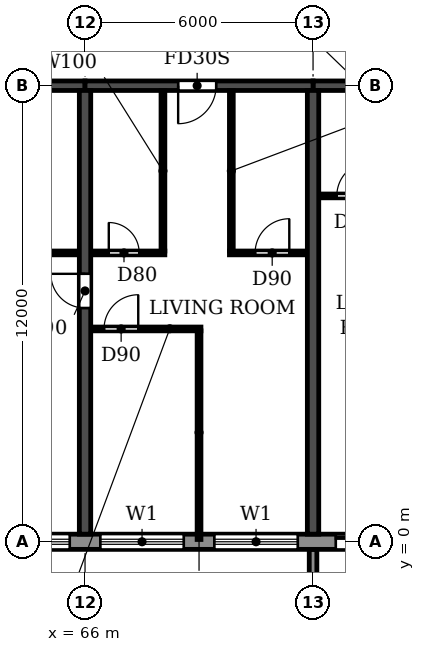
"""IFC4 building model, lengths in metres.
Left out: names, types, materials, properties, quantities, classifications, styles, units other than length and angle.
Written with IfcOpenShell. Run it as: python <this file> out.ifc"""

import sys

from ifc_helpers import new_model, si_unit, direction, frame, frame_2d, origin, place, context, subcontext, project, spatial, polyline, rectangle, outline, extrude, source, transform, mapped, element, fill, save


model = new_model("IFC4")
c1 = context("Model", 3, precision=1e-05, world=origin(), true_north=direction((0.0, 1.0)))
c2 = subcontext(c1, "Body", "Model", "MODEL_VIEW")
j1 = project(units=[si_unit("LENGTHUNIT", "METRE"), si_unit("PLANEANGLEUNIT", "RADIAN")], contexts=[c1])
p1 = place(None, origin())
s1 = spatial("IfcSite", under=j1, at=p1, CompositionType="ELEMENT")
p2 = place(p1, origin())
s2 = spatial("IfcBuilding", under=s1, at=p2, CompositionType="ELEMENT")
p3 = place(p2, frame((0.0, 0.0, 162.0)))
s3 = spatial("IfcBuildingStorey", under=s2, at=p3, CompositionType="ELEMENT", Elevation=162.0)
p4 = place(p3, frame((66.0, 0.2, 0.0), z_axis=(0.0, 0.0, 1.0), x_axis=(0.0, 1.0, 0.0)))
e1 = element("IfcWall", 1, at=p4, inside=s3, PredefinedType="SHEAR", context=c2, shape_type="SweptSolid", body=[
    extrude(rectangle(XDim=11.675, YDim=0.3, at=frame_2d((5.837, 0.0))), origin(), (0.0, 0.0, 1.0), 2.95),
])
p5 = place(p4, frame((5.95, 0.0, 0.0)))
e2 = element("IfcOpeningElement", 2, at=p5, cuts=e1, PredefinedType="OPENING", context=c2, shape_type="SweptSolid", body=[
    extrude(rectangle(XDim=0.9, YDim=2.1, at=frame_2d((0.45, 1.05))), frame((0.0, 0.16, 0.0), z_axis=(0.0, -1.0, 0.0), x_axis=(1.0, 0.0, 0.0)), (0.0, 0.0, 1.0), 0.32),
])
p6 = place(p3, frame((72.0, 0.2, 0.0), z_axis=(0.0, 0.0, 1.0), x_axis=(0.0, 1.0, 0.0)))
e3 = element("IfcWall", 3, at=p6, inside=s3, PredefinedType="SHEAR", context=c2, shape_type="SweptSolid", body=[
    extrude(rectangle(XDim=11.675, YDim=0.3, at=frame_2d((5.837, 0.0))), origin(), (0.0, 0.0, 1.0), 2.95),
])
p7 = place(p3, frame((60.0, 12.0, 0.0), z_axis=(0.0, 0.0, 1.0), x_axis=(1.0, 0.0, 0.0)))
e4 = element("IfcWall", 4, at=p7, inside=s3, PredefinedType="SHEAR", context=c2, shape_type="SweptSolid", body=[
    extrude(rectangle(XDim=6.0, YDim=0.25, at=frame_2d((3.0, 0.0))), origin(), (0.0, 0.0, 1.0), 2.35),
])
p8 = place(p3, frame((66.0, 12.0, 0.0), z_axis=(0.0, 0.0, 1.0), x_axis=(1.0, 0.0, 0.0)))
e5 = element("IfcWall", 5, at=p8, inside=s3, PredefinedType="SHEAR", context=c2, shape_type="SweptSolid", body=[
    extrude(rectangle(XDim=6.0, YDim=0.25, at=frame_2d((3.0, 0.0))), origin(), (0.0, 0.0, 1.0), 2.35),
])
p9 = place(p8, frame((2.45, 0.0, 0.0)))
e6 = element("IfcOpeningElement", 6, at=p9, cuts=e5, PredefinedType="OPENING", context=c2, shape_type="SweptSolid", body=[
    extrude(rectangle(XDim=1.0, YDim=2.1, at=frame_2d((0.5, 1.05))), frame((0.0, 0.135, 0.0), z_axis=(0.0, -1.0, 0.0), x_axis=(1.0, 0.0, 0.0)), (0.0, 0.0, 1.0), 0.27),
])
p10 = place(p3, frame((72.0, 12.0, 0.0), z_axis=(0.0, 0.0, 1.0), x_axis=(1.0, 0.0, 0.0)))
e7 = element("IfcWall", 7, at=p10, inside=s3, PredefinedType="SHEAR", context=c2, shape_type="SweptSolid", body=[
    extrude(rectangle(XDim=6.0, YDim=0.25, at=frame_2d((3.0, 0.0))), origin(), (0.0, 0.0, 1.0), 2.35),
])
p11 = place(p10, frame((2.55, 0.0, 0.0)))
e8 = element("IfcOpeningElement", 8, at=p11, cuts=e7, PredefinedType="OPENING", context=c2, shape_type="SweptSolid", body=[
    extrude(rectangle(XDim=1.0, YDim=2.1, at=frame_2d((0.5, 1.05))), frame((0.0, 0.135, 0.0), z_axis=(0.0, -1.0, 0.0), x_axis=(1.0, 0.0, 0.0)), (0.0, 0.0, 1.0), 0.27),
])
p12 = place(p3, frame((22.683, 0.0, 0.0), z_axis=(0.0, 0.0, 1.0), x_axis=(1.0, 0.0, 0.0)))
e9 = element("IfcWall", 9, at=p12, inside=s3, PredefinedType="STANDARD", context=c2, shape_type="SweptSolid", body=[
    extrude(rectangle(XDim=56.634, YDim=0.4, at=frame_2d((28.317, 0.0))), origin(), (0.0, 0.0, 1.0), 2.95),
])
p13 = place(p12, frame((1.717, 0.0, 0.9)))
e10 = element("IfcOpeningElement", 10, at=p13, cuts=e9, PredefinedType="OPENING", context=c2, shape_type="SweptSolid", body=[
    extrude(rectangle(XDim=2.2, YDim=1.5, at=frame_2d((1.1, 0.75))), frame((0.0, 0.21, 0.0), z_axis=(0.0, -1.0, 0.0), x_axis=(1.0, 0.0, 0.0)), (0.0, 0.0, 1.0), 0.42),
])
p14 = place(p12, frame((4.917, 0.0, 0.0)))
e11 = element("IfcOpeningElement", 11, at=p14, cuts=e9, PredefinedType="OPENING", context=c2, shape_type="SweptSolid", body=[
    extrude(rectangle(XDim=1.8, YDim=2.4, at=frame_2d((0.9, 1.2))), frame((0.0, 0.21, 0.0), z_axis=(0.0, -1.0, 0.0), x_axis=(1.0, 0.0, 0.0)), (0.0, 0.0, 1.0), 0.42),
])
p15 = place(p12, frame((7.717, 0.0, 0.9)))
e12 = element("IfcOpeningElement", 12, at=p15, cuts=e9, PredefinedType="OPENING", context=c2, shape_type="SweptSolid", body=[
    extrude(rectangle(XDim=2.2, YDim=1.5, at=frame_2d((1.1, 0.75))), frame((0.0, 0.21, 0.0), z_axis=(0.0, -1.0, 0.0), x_axis=(1.0, 0.0, 0.0)), (0.0, 0.0, 1.0), 0.42),
])
p16 = place(p12, frame((10.717, 0.0, 0.9)))
e13 = element("IfcOpeningElement", 13, at=p16, cuts=e9, PredefinedType="OPENING", context=c2, shape_type="SweptSolid", body=[
    extrude(rectangle(XDim=2.2, YDim=1.5, at=frame_2d((1.1, 0.75))), frame((0.0, 0.21, 0.0), z_axis=(0.0, -1.0, 0.0), x_axis=(1.0, 0.0, 0.0)), (0.0, 0.0, 1.0), 0.42),
])
p17 = place(p12, frame((13.717, 0.0, 0.9)))
e14 = element("IfcOpeningElement", 14, at=p17, cuts=e9, PredefinedType="OPENING", context=c2, shape_type="SweptSolid", body=[
    extrude(rectangle(XDim=2.2, YDim=1.5, at=frame_2d((1.1, 0.75))), frame((0.0, 0.21, 0.0), z_axis=(0.0, -1.0, 0.0), x_axis=(1.0, 0.0, 0.0)), (0.0, 0.0, 1.0), 0.42),
])
p18 = place(p12, frame((16.917, 0.0, 0.0)))
e15 = element("IfcOpeningElement", 15, at=p18, cuts=e9, PredefinedType="OPENING", context=c2, shape_type="SweptSolid", body=[
    extrude(rectangle(XDim=1.8, YDim=2.4, at=frame_2d((0.9, 1.2))), frame((0.0, 0.21, 0.0), z_axis=(0.0, -1.0, 0.0), x_axis=(1.0, 0.0, 0.0)), (0.0, 0.0, 1.0), 0.42),
])
p19 = place(p12, frame((19.717, 0.0, 0.9)))
e16 = element("IfcOpeningElement", 16, at=p19, cuts=e9, PredefinedType="OPENING", context=c2, shape_type="SweptSolid", body=[
    extrude(rectangle(XDim=2.2, YDim=1.5, at=frame_2d((1.1, 0.75))), frame((0.0, 0.21, 0.0), z_axis=(0.0, -1.0, 0.0), x_axis=(1.0, 0.0, 0.0)), (0.0, 0.0, 1.0), 0.42),
])
p20 = place(p12, frame((22.717, 0.0, 0.9)))
e17 = element("IfcOpeningElement", 17, at=p20, cuts=e9, PredefinedType="OPENING", context=c2, shape_type="SweptSolid", body=[
    extrude(rectangle(XDim=2.2, YDim=1.5, at=frame_2d((1.1, 0.75))), frame((0.0, 0.21, 0.0), z_axis=(0.0, -1.0, 0.0), x_axis=(1.0, 0.0, 0.0)), (0.0, 0.0, 1.0), 0.42),
])
p21 = place(p12, frame((25.717, 0.0, 0.9)))
e18 = element("IfcOpeningElement", 18, at=p21, cuts=e9, PredefinedType="OPENING", context=c2, shape_type="SweptSolid", body=[
    extrude(rectangle(XDim=2.2, YDim=1.5, at=frame_2d((1.1, 0.75))), frame((0.0, 0.21, 0.0), z_axis=(0.0, -1.0, 0.0), x_axis=(1.0, 0.0, 0.0)), (0.0, 0.0, 1.0), 0.42),
])
p22 = place(p12, frame((28.717, 0.0, 0.9)))
e19 = element("IfcOpeningElement", 19, at=p22, cuts=e9, PredefinedType="OPENING", context=c2, shape_type="SweptSolid", body=[
    extrude(rectangle(XDim=2.2, YDim=1.5, at=frame_2d((1.1, 0.75))), frame((0.0, 0.21, 0.0), z_axis=(0.0, -1.0, 0.0), x_axis=(1.0, 0.0, 0.0)), (0.0, 0.0, 1.0), 0.42),
])
p23 = place(p12, frame((31.717, 0.0, 0.9)))
e20 = element("IfcOpeningElement", 20, at=p23, cuts=e9, PredefinedType="OPENING", context=c2, shape_type="SweptSolid", body=[
    extrude(rectangle(XDim=2.2, YDim=1.5, at=frame_2d((1.1, 0.75))), frame((0.0, 0.21, 0.0), z_axis=(0.0, -1.0, 0.0), x_axis=(1.0, 0.0, 0.0)), (0.0, 0.0, 1.0), 0.42),
])
p24 = place(p12, frame((34.717, 0.0, 0.9)))
e21 = element("IfcOpeningElement", 21, at=p24, cuts=e9, PredefinedType="OPENING", context=c2, shape_type="SweptSolid", body=[
    extrude(rectangle(XDim=2.2, YDim=1.5, at=frame_2d((1.1, 0.75))), frame((0.0, 0.21, 0.0), z_axis=(0.0, -1.0, 0.0), x_axis=(1.0, 0.0, 0.0)), (0.0, 0.0, 1.0), 0.42),
])
p25 = place(p12, frame((37.717, 0.0, 0.9)))
e22 = element("IfcOpeningElement", 22, at=p25, cuts=e9, PredefinedType="OPENING", context=c2, shape_type="SweptSolid", body=[
    extrude(rectangle(XDim=2.2, YDim=1.5, at=frame_2d((1.1, 0.75))), frame((0.0, 0.21, 0.0), z_axis=(0.0, -1.0, 0.0), x_axis=(1.0, 0.0, 0.0)), (0.0, 0.0, 1.0), 0.42),
])
p26 = place(p12, frame((40.717, 0.0, 0.9)))
e23 = element("IfcOpeningElement", 23, at=p26, cuts=e9, PredefinedType="OPENING", context=c2, shape_type="SweptSolid", body=[
    extrude(rectangle(XDim=2.2, YDim=1.5, at=frame_2d((1.1, 0.75))), frame((0.0, 0.21, 0.0), z_axis=(0.0, -1.0, 0.0), x_axis=(1.0, 0.0, 0.0)), (0.0, 0.0, 1.0), 0.42),
])
p27 = place(p12, frame((43.717, 0.0, 0.9)))
e24 = element("IfcOpeningElement", 24, at=p27, cuts=e9, PredefinedType="OPENING", context=c2, shape_type="SweptSolid", body=[
    extrude(rectangle(XDim=2.2, YDim=1.5, at=frame_2d((1.1, 0.75))), frame((0.0, 0.21, 0.0), z_axis=(0.0, -1.0, 0.0), x_axis=(1.0, 0.0, 0.0)), (0.0, 0.0, 1.0), 0.42),
])
p28 = place(p12, frame((46.717, 0.0, 0.9)))
e25 = element("IfcOpeningElement", 25, at=p28, cuts=e9, PredefinedType="OPENING", context=c2, shape_type="SweptSolid", body=[
    extrude(rectangle(XDim=2.2, YDim=1.5, at=frame_2d((1.1, 0.75))), frame((0.0, 0.21, 0.0), z_axis=(0.0, -1.0, 0.0), x_axis=(1.0, 0.0, 0.0)), (0.0, 0.0, 1.0), 0.42),
])
p29 = place(p12, frame((49.917, 0.0, 0.0)))
e26 = element("IfcOpeningElement", 26, at=p29, cuts=e9, PredefinedType="OPENING", context=c2, shape_type="SweptSolid", body=[
    extrude(rectangle(XDim=1.8, YDim=2.4, at=frame_2d((0.9, 1.2))), frame((0.0, 0.21, 0.0), z_axis=(0.0, -1.0, 0.0), x_axis=(1.0, 0.0, 0.0)), (0.0, 0.0, 1.0), 0.42),
])
p30 = place(p12, frame((52.717, 0.0, 0.9)))
e27 = element("IfcOpeningElement", 27, at=p30, cuts=e9, PredefinedType="OPENING", context=c2, shape_type="SweptSolid", body=[
    extrude(rectangle(XDim=2.2, YDim=1.5, at=frame_2d((1.1, 0.75))), frame((0.0, 0.21, 0.0), z_axis=(0.0, -1.0, 0.0), x_axis=(1.0, 0.0, 0.0)), (0.0, 0.0, 1.0), 0.42),
])
m1 = source(origin(), c2, "Body", "SweptSolid", [
    extrude(outline(polyline([(0.0, 0.0), (0.2, 0.0), (0.2, 1.65), (0.0, 1.65), (0.0, 0.0)])), origin(), (0.0, 0.0, 1.0), 3.1),
])
p31 = place(p3, frame((71.9, -1.85, 0.0)))
e28 = element("IfcWall", 28, at=p31, inside=s3, PredefinedType="STANDARD", context=c2, shape_type="MappedRepresentation", body=[
    mapped(m1, transform((0.0, 0.0, 0.0))),
])
p32 = place(p3, frame((66.16, 5.6, 0.0), z_axis=(0.0, 0.0, 1.0), x_axis=(1.0, 0.0, 0.0)))
e29 = element("IfcWall", 29, at=p32, inside=s3, PredefinedType="PARTITIONING", context=c2, shape_type="SweptSolid", body=[
    extrude(rectangle(XDim=2.89, YDim=0.1, at=frame_2d((1.445, 0.0))), origin(), (0.0, 0.0, 1.0), 2.95),
])
p33 = place(p32, frame((0.34, 0.0, 0.0)))
e30 = element("IfcOpeningElement", 30, at=p33, cuts=e29, PredefinedType="OPENING", context=c2, shape_type="SweptSolid", body=[
    extrude(rectangle(XDim=0.9, YDim=2.1, at=frame_2d((0.45, 1.05))), frame((0.0, 0.06, 0.0), z_axis=(0.0, -1.0, 0.0), x_axis=(1.0, 0.0, 0.0)), (0.0, 0.0, 1.0), 0.12),
])
p34 = place(p3, frame((63.1, 7.6, 0.0), z_axis=(0.0, 0.0, 1.0), x_axis=(1.0, 0.0, 0.0)))
e31 = element("IfcWall", 31, at=p34, inside=s3, PredefinedType="PARTITIONING", context=c2, shape_type="SweptSolid", body=[
    extrude(rectangle(XDim=2.74, YDim=0.1, at=frame_2d((1.37, 0.0))), origin(), (0.0, 0.0, 1.0), 2.95),
])
p35 = place(p34, frame((1.0, 0.0, 0.0)))
e32 = element("IfcOpeningElement", 32, at=p35, cuts=e31, PredefinedType="OPENING", context=c2, shape_type="SweptSolid", body=[
    extrude(rectangle(XDim=0.8, YDim=2.1, at=frame_2d((0.4, 1.05))), frame((0.0, 0.06, 0.0), z_axis=(0.0, -1.0, 0.0), x_axis=(1.0, 0.0, 0.0)), (0.0, 0.0, 1.0), 0.12),
])
p36 = place(p3, frame((66.16, 7.6, 0.0), z_axis=(0.0, 0.0, 1.0), x_axis=(1.0, 0.0, 0.0)))
e33 = element("IfcWall", 33, at=p36, inside=s3, PredefinedType="PARTITIONING", context=c2, shape_type="SweptSolid", body=[
    extrude(rectangle(XDim=1.94, YDim=0.1, at=frame_2d((0.97, 0.0))), origin(), (0.0, 0.0, 1.0), 2.95),
])
p37 = place(p36, frame((0.465, 0.0, 0.0)))
e34 = element("IfcOpeningElement", 34, at=p37, cuts=e33, PredefinedType="OPENING", context=c2, shape_type="SweptSolid", body=[
    extrude(rectangle(XDim=0.8, YDim=2.1, at=frame_2d((0.4, 1.05))), frame((0.0, 0.06, 0.0), z_axis=(0.0, -1.0, 0.0), x_axis=(1.0, 0.0, 0.0)), (0.0, 0.0, 1.0), 0.12),
])
p38 = place(p3, frame((69.8, 7.6, 0.0), z_axis=(0.0, 0.0, 1.0), x_axis=(1.0, 0.0, 0.0)))
e35 = element("IfcWall", 35, at=p38, inside=s3, PredefinedType="PARTITIONING", context=c2, shape_type="SweptSolid", body=[
    extrude(rectangle(XDim=2.04, YDim=0.1, at=frame_2d((1.02, 0.0))), origin(), (0.0, 0.0, 1.0), 2.95),
])
p39 = place(p38, frame((0.675, 0.0, 0.0)))
e36 = element("IfcOpeningElement", 36, at=p39, cuts=e35, PredefinedType="OPENING", context=c2, shape_type="SweptSolid", body=[
    extrude(rectangle(XDim=0.9, YDim=2.1, at=frame_2d((0.45, 1.05))), frame((0.0, 0.06, 0.0), z_axis=(0.0, -1.0, 0.0), x_axis=(1.0, 0.0, 0.0)), (0.0, 0.0, 1.0), 0.12),
])
p40 = place(p3, frame((72.16, 9.1, 0.0), z_axis=(0.0, 0.0, 1.0), x_axis=(1.0, 0.0, 0.0)))
e37 = element("IfcWall", 37, at=p40, inside=s3, PredefinedType="PARTITIONING", context=c2, shape_type="SweptSolid", body=[
    extrude(rectangle(XDim=2.04, YDim=0.1, at=frame_2d((1.02, 0.0))), origin(), (0.0, 0.0, 1.0), 2.95),
])
p41 = place(p40, frame((0.465, 0.0, 0.0)))
e38 = element("IfcOpeningElement", 38, at=p41, cuts=e37, PredefinedType="OPENING", context=c2, shape_type="SweptSolid", body=[
    extrude(rectangle(XDim=0.9, YDim=2.1, at=frame_2d((0.45, 1.05))), frame((0.0, 0.06, 0.0), z_axis=(0.0, -1.0, 0.0), x_axis=(1.0, 0.0, 0.0)), (0.0, 0.0, 1.0), 0.12),
])
p42 = place(p3, frame((68.05, 7.65, 0.0), z_axis=(0.0, 0.0, 1.0), x_axis=(0.0, 1.0, 0.0)))
e39 = element("IfcWall", 39, at=p42, inside=s3, PredefinedType="PARTITIONING", context=c2, shape_type="SweptSolid", body=[
    extrude(rectangle(XDim=4.215, YDim=0.1, at=frame_2d((2.107, 0.0))), origin(), (0.0, 0.0, 1.0), 2.95),
])
p43 = place(p3, frame((69.0, 0.06, 0.0), z_axis=(0.0, 0.0, 1.0), x_axis=(0.0, 1.0, 0.0)))
e40 = element("IfcWall", 40, at=p43, inside=s3, PredefinedType="PARTITIONING", context=c2, shape_type="SweptSolid", body=[
    extrude(rectangle(XDim=5.49, YDim=0.1, at=frame_2d((2.745, 0.0))), origin(), (0.0, 0.0, 1.0), 2.95),
])
p44 = place(p3, frame((69.85, 7.65, 0.0), z_axis=(0.0, 0.0, 1.0), x_axis=(0.0, 1.0, 0.0)))
e41 = element("IfcWall", 41, at=p44, inside=s3, PredefinedType="PARTITIONING", context=c2, shape_type="SweptSolid", body=[
    extrude(rectangle(XDim=4.215, YDim=0.1, at=frame_2d((2.107, 0.0))), origin(), (0.0, 0.0, 1.0), 2.95),
])
p45 = place(p26, origin())
e42 = element("IfcWindow", 42, at=p45, inside=s3, PartitioningType="DOUBLE_PANEL_HORIZONTAL", PredefinedType="WINDOW", context=c2, shape_type="SweptSolid", body=[
    extrude(rectangle(XDim=2.2, YDim=1.5, at=frame_2d((1.1, 0.75))), frame((0.0, 0.03, 0.0), z_axis=(0.0, -1.0, 0.0), x_axis=(1.0, 0.0, 0.0)), (0.0, 0.0, 1.0), 0.06),
])
fill(e23, e42)
p46 = place(p27, origin())
e43 = element("IfcWindow", 43, at=p46, inside=s3, PartitioningType="DOUBLE_PANEL_HORIZONTAL", PredefinedType="WINDOW", context=c2, shape_type="SweptSolid", body=[
    extrude(rectangle(XDim=2.2, YDim=1.5, at=frame_2d((1.1, 0.75))), frame((0.0, 0.03, 0.0), z_axis=(0.0, -1.0, 0.0), x_axis=(1.0, 0.0, 0.0)), (0.0, 0.0, 1.0), 0.06),
])
fill(e24, e43)
p47 = place(p28, origin())
e44 = element("IfcWindow", 44, at=p47, inside=s3, PartitioningType="DOUBLE_PANEL_HORIZONTAL", PredefinedType="WINDOW", context=c2, shape_type="SweptSolid", body=[
    extrude(rectangle(XDim=2.2, YDim=1.5, at=frame_2d((1.1, 0.75))), frame((0.0, 0.03, 0.0), z_axis=(0.0, -1.0, 0.0), x_axis=(1.0, 0.0, 0.0)), (0.0, 0.0, 1.0), 0.06),
])
fill(e25, e44)
p48 = place(p29, origin())
e45 = element("IfcDoor", 45, at=p48, inside=s3, OperationType="DOUBLE_DOOR_SLIDING", PredefinedType="DOOR", context=c2, shape_type="SweptSolid", body=[
    extrude(rectangle(XDim=1.8, YDim=2.4, at=frame_2d((0.9, 1.2))), frame((0.0, 0.025, 0.0), z_axis=(0.0, -1.0, 0.0), x_axis=(1.0, 0.0, 0.0)), (0.0, 0.0, 1.0), 0.05),
])
fill(e26, e45)
p49 = place(p5, origin())
e46 = element("IfcDoor", 46, at=p49, inside=s3, OperationType="SINGLE_SWING_RIGHT", PredefinedType="DOOR", context=c2, shape_type="SweptSolid", body=[
    extrude(rectangle(XDim=0.9, YDim=2.1, at=frame_2d((0.45, 1.05))), frame((0.0, 0.025, 0.0), z_axis=(0.0, -1.0, 0.0), x_axis=(1.0, 0.0, 0.0)), (0.0, 0.0, 1.0), 0.05),
])
fill(e2, e46)
p50 = place(p33, origin())
e47 = element("IfcDoor", 47, at=p50, inside=s3, OperationType="SINGLE_SWING_RIGHT", PredefinedType="DOOR", context=c2, shape_type="SweptSolid", body=[
    extrude(rectangle(XDim=0.9, YDim=2.1, at=frame_2d((0.45, 1.05))), frame((0.0, 0.025, 0.0), z_axis=(0.0, -1.0, 0.0), x_axis=(1.0, 0.0, 0.0)), (0.0, 0.0, 1.0), 0.05),
])
fill(e30, e47)
p51 = place(p37, origin())
e48 = element("IfcDoor", 48, at=p51, inside=s3, OperationType="SINGLE_SWING_LEFT", PredefinedType="DOOR", context=c2, shape_type="SweptSolid", body=[
    extrude(rectangle(XDim=0.8, YDim=2.1, at=frame_2d((0.4, 1.05))), frame((0.0, 0.025, 0.0), z_axis=(0.0, -1.0, 0.0), x_axis=(1.0, 0.0, 0.0)), (0.0, 0.0, 1.0), 0.05),
])
fill(e34, e48)
p52 = place(p9, frame((1.0, 0.0, 0.0), z_axis=(0.0, 0.0, 1.0), x_axis=(-1.0, 0.0, 0.0)))
e49 = element("IfcDoor", 49, at=p52, inside=s3, OperationType="SINGLE_SWING_RIGHT", PredefinedType="DOOR", context=c2, shape_type="SweptSolid", body=[
    extrude(rectangle(XDim=1.0, YDim=2.1, at=frame_2d((0.5, 1.05))), frame((0.0, 0.025, 0.0), z_axis=(0.0, -1.0, 0.0), x_axis=(1.0, 0.0, 0.0)), (0.0, 0.0, 1.0), 0.05),
])
fill(e6, e49)
p53 = place(p39, origin())
e50 = element("IfcDoor", 50, at=p53, inside=s3, OperationType="SINGLE_SWING_RIGHT", PredefinedType="DOOR", context=c2, shape_type="SweptSolid", body=[
    extrude(rectangle(XDim=0.9, YDim=2.1, at=frame_2d((0.45, 1.05))), frame((0.0, 0.025, 0.0), z_axis=(0.0, -1.0, 0.0), x_axis=(1.0, 0.0, 0.0)), (0.0, 0.0, 1.0), 0.05),
])
fill(e36, e50)
p54 = place(p41, origin())
e51 = element("IfcDoor", 51, at=p54, inside=s3, OperationType="SINGLE_SWING_RIGHT", PredefinedType="DOOR", context=c2, shape_type="SweptSolid", body=[
    extrude(rectangle(XDim=0.9, YDim=2.1, at=frame_2d((0.45, 1.05))), frame((0.0, 0.025, 0.0), z_axis=(0.0, -1.0, 0.0), x_axis=(1.0, 0.0, 0.0)), (0.0, 0.0, 1.0), 0.05),
])
fill(e38, e51)
save(model, sys.argv[1])
